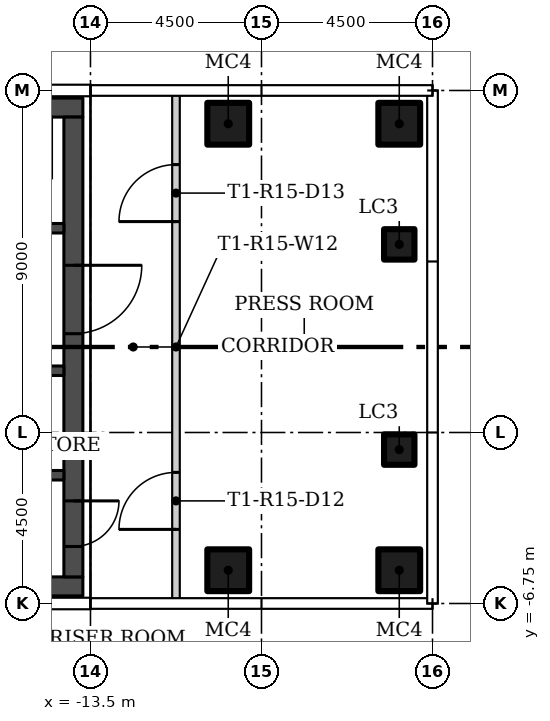
"""IFC4 building model, lengths in metres.
Left out: names, types, materials, properties, quantities, classifications, styles, units other than length and angle.
Written with IfcOpenShell. Run it as: python <this file> out.ifc"""

import sys

from ifc_helpers import new_model, si_unit, direction, frame, frame_2d, origin, origin_2d, place, context, subcontext, project, spatial, rectangle, hollow_rectangle, extrude, element, fill, save


model = new_model("IFC4")
c1 = context("Model", 3, precision=1e-05, world=origin(), true_north=direction((0.0, 1.0)))
c2 = subcontext(c1, "Body", "Model", "MODEL_VIEW")
j1 = project(units=[si_unit("LENGTHUNIT", "METRE"), si_unit("PLANEANGLEUNIT", "RADIAN")], contexts=[c1])
p1 = place(None, origin())
s1 = spatial("IfcSite", under=j1, at=p1, CompositionType="ELEMENT")
p2 = place(p1, origin())
s2 = spatial("IfcBuilding", under=s1, at=p2, CompositionType="ELEMENT")
p3 = place(p2, frame((0.0, 0.0, 142.8)))
s3 = spatial("IfcBuildingStorey", under=s2, at=p3, CompositionType="ELEMENT", Elevation=142.8)
for number, where in (
    (1, (-9.875, -5.875, 0.0)),
    (2, (-5.375, -5.875, 0.0)),
    (3, (-9.875, 5.875, 0.0)),
    (4, (-5.375, 5.875, 0.0)),
):
    element("IfcColumn", number, at=place(p3, frame(where)), inside=s3, PredefinedType="COLUMN", context=c2, shape_type="SweptSolid", body=[
        extrude(hollow_rectangle(XDim=1.1, YDim=1.1, WallThickness=0.04, at=origin_2d()), origin(), (0.0, 0.0, 1.0), 3.55),
    ])
for number, where in (
    (5, (-5.375, -2.7, 0.0)),
    (6, (-5.375, 2.7, 0.0)),
):
    element("IfcColumn", number, at=place(p3, frame(where)), inside=s3, PredefinedType="COLUMN", context=c2, shape_type="SweptSolid", body=[
        extrude(hollow_rectangle(XDim=0.8, YDim=0.8, WallThickness=0.03, at=origin_2d()), origin(), (0.0, 0.0, 1.0), 3.55),
    ])
p4 = place(p3, frame((-11.25, -6.655, 0.0), z_axis=(0.0, 0.0, 1.0), x_axis=(0.0, 1.0, 0.0)))
e7 = element("IfcWall", 7, at=p4, inside=s3, PredefinedType="PARTITIONING", context=c2, shape_type="SweptSolid", body=[
    extrude(rectangle(XDim=13.31, YDim=0.2, at=frame_2d((6.655, 0.0))), origin(), (0.0, 0.0, 1.0), 3.55),
])
p5 = place(p4, frame((1.855, 0.0, 0.0)))
e8 = element("IfcOpeningElement", 8, at=p5, cuts=e7, PredefinedType="OPENING", context=c2, shape_type="SweptSolid", body=[
    extrude(rectangle(XDim=1.5, YDim=2.1, at=frame_2d((0.75, 1.05))), frame((0.0, 0.11, 0.0), z_axis=(0.0, -1.0, 0.0), x_axis=(1.0, 0.0, 0.0)), (0.0, 0.0, 1.0), 0.22),
])
p6 = place(p4, frame((9.955, 0.0, 0.0)))
e9 = element("IfcOpeningElement", 9, at=p6, cuts=e7, PredefinedType="OPENING", context=c2, shape_type="SweptSolid", body=[
    extrude(rectangle(XDim=1.5, YDim=2.1, at=frame_2d((0.75, 1.05))), frame((0.0, 0.11, 0.0), z_axis=(0.0, -1.0, 0.0), x_axis=(1.0, 0.0, 0.0)), (0.0, 0.0, 1.0), 0.22),
])
for number, where in (
    (10, (-26.8, -6.3, 0.0)),
    (11, (-26.8, 6.3, 0.0)),
):
    element("IfcWall", number, at=place(p3, frame(where)), inside=s3, PredefinedType="SHEAR", context=c2, shape_type="SweptSolid", body=[
        extrude(rectangle(XDim=13.1, YDim=0.5, at=frame_2d((6.55, 0.0))), origin(), (0.0, 0.0, 1.0), 3.55),
    ])
p7 = place(p3, frame((-13.95, 6.05, 0.0), z_axis=(0.0, 0.0, 1.0), x_axis=(0.0, -1.0, 0.0)))
e12 = element("IfcWall", 12, at=p7, inside=s3, PredefinedType="SHEAR", context=c2, shape_type="SweptSolid", body=[
    extrude(rectangle(XDim=12.1, YDim=0.5, at=frame_2d((6.05, 0.0))), origin(), (0.0, 0.0, 1.0), 3.55),
])
p8 = place(p7, frame((10.1, 0.0, 0.0)))
e13 = element("IfcOpeningElement", 13, at=p8, cuts=e12, PredefinedType="OPENING", context=c2, shape_type="SweptSolid", body=[
    extrude(rectangle(XDim=1.2, YDim=2.1, at=frame_2d((0.6, 1.05))), frame((0.0, 0.26, 0.0), z_axis=(0.0, -1.0, 0.0), x_axis=(1.0, 0.0, 0.0)), (0.0, 0.0, 1.0), 0.52),
])
p9 = place(p7, frame((3.9, 0.0, 0.0)))
e14 = element("IfcOpeningElement", 14, at=p9, cuts=e12, PredefinedType="OPENING", context=c2, shape_type="SweptSolid", body=[
    extrude(rectangle(XDim=1.8, YDim=2.4, at=frame_2d((0.9, 1.2))), frame((0.0, 0.26, 0.0), z_axis=(0.0, -1.0, 0.0), x_axis=(1.0, 0.0, 0.0)), (0.0, 0.0, 1.0), 0.52),
])
p10 = place(p3, frame((-14.2, -3.375, 0.0), z_axis=(0.0, 0.0, 1.0), x_axis=(-1.0, 0.0, 0.0)))
e15 = element("IfcWall", 15, at=p10, inside=s3, PredefinedType="SHEAR", context=c2, shape_type="SweptSolid", body=[
    extrude(rectangle(XDim=12.1, YDim=0.25, at=frame_2d((6.05, 0.0))), origin(), (0.0, 0.0, 1.0), 3.55),
])
p11 = place(p10, frame((10.95, 0.0, 0.0)))
e16 = element("IfcOpeningElement", 16, at=p11, cuts=e15, PredefinedType="OPENING", context=c2, shape_type="SweptSolid", body=[
    extrude(rectangle(XDim=1.1, YDim=2.1, at=frame_2d((0.55, 1.05))), frame((0.0, 0.135, 0.0), z_axis=(0.0, -1.0, 0.0), x_axis=(1.0, 0.0, 0.0)), (0.0, 0.0, 1.0), 0.27),
])
p12 = place(p3, frame((-14.2, -0.625, 0.0), z_axis=(0.0, 0.0, 1.0), x_axis=(-1.0, 0.0, 0.0)))
e17 = element("IfcWall", 17, at=p12, inside=s3, PredefinedType="SHEAR", context=c2, shape_type="SweptSolid", body=[
    extrude(rectangle(XDim=12.1, YDim=0.25, at=frame_2d((6.05, 0.0))), origin(), (0.0, 0.0, 1.0), 3.55),
])
p13 = place(p12, frame((8.65, 0.0, 0.0)))
e18 = element("IfcOpeningElement", 18, at=p13, cuts=e17, PredefinedType="OPENING", context=c2, shape_type="SweptSolid", body=[
    extrude(rectangle(XDim=1.2, YDim=2.1, at=frame_2d((0.6, 1.05))), frame((0.0, 0.135, 0.0), z_axis=(0.0, -1.0, 0.0), x_axis=(1.0, 0.0, 0.0)), (0.0, 0.0, 1.0), 0.27),
])
p14 = place(p12, frame((2.15, 0.0, 0.0)))
e19 = element("IfcOpeningElement", 19, at=p14, cuts=e17, PredefinedType="OPENING", context=c2, shape_type="SweptSolid", body=[
    extrude(rectangle(XDim=0.9, YDim=2.1, at=frame_2d((0.45, 1.05))), frame((0.0, 0.135, 0.0), z_axis=(0.0, -1.0, 0.0), x_axis=(1.0, 0.0, 0.0)), (0.0, 0.0, 1.0), 0.27),
])
p15 = place(p12, frame((0.525, 0.0, 0.0)))
e20 = element("IfcOpeningElement", 20, at=p15, cuts=e17, PredefinedType="OPENING", context=c2, shape_type="SweptSolid", body=[
    extrude(rectangle(XDim=0.9, YDim=2.1, at=frame_2d((0.45, 1.05))), frame((0.0, 0.135, 0.0), z_axis=(0.0, -1.0, 0.0), x_axis=(1.0, 0.0, 0.0)), (0.0, 0.0, 1.0), 0.27),
])
p16 = place(p3, frame((-26.3, 3.125, 0.0)))
e21 = element("IfcWall", 21, at=p16, inside=s3, PredefinedType="SHEAR", context=c2, shape_type="SweptSolid", body=[
    extrude(rectangle(XDim=12.1, YDim=0.25, at=frame_2d((6.05, 0.0))), origin(), (0.0, 0.0, 1.0), 3.55),
])
p17 = place(p16, frame((6.95, 0.0, 0.0)))
e22 = element("IfcOpeningElement", 22, at=p17, cuts=e21, PredefinedType="OPENING", context=c2, shape_type="SweptSolid", body=[
    extrude(rectangle(XDim=1.1, YDim=2.1, at=frame_2d((0.55, 1.05))), frame((0.0, 0.135, 0.0), z_axis=(0.0, -1.0, 0.0), x_axis=(1.0, 0.0, 0.0)), (0.0, 0.0, 1.0), 0.27),
])
p18 = place(p16, frame((10.075, 0.0, 0.0)))
e23 = element("IfcOpeningElement", 23, at=p18, cuts=e21, PredefinedType="OPENING", context=c2, shape_type="SweptSolid", body=[
    extrude(rectangle(XDim=1.1, YDim=2.1, at=frame_2d((0.55, 1.05))), frame((0.0, 0.135, 0.0), z_axis=(0.0, -1.0, 0.0), x_axis=(1.0, 0.0, 0.0)), (0.0, 0.0, 1.0), 0.27),
])
p19 = place(p16, frame((0.7, 0.0, 0.0)))
e24 = element("IfcOpeningElement", 24, at=p19, cuts=e21, PredefinedType="OPENING", context=c2, shape_type="SweptSolid", body=[
    extrude(rectangle(XDim=0.9, YDim=2.1, at=frame_2d((0.45, 1.05))), frame((0.0, 0.135, 0.0), z_axis=(0.0, -1.0, 0.0), x_axis=(1.0, 0.0, 0.0)), (0.0, 0.0, 1.0), 0.27),
])
p20 = place(p16, frame((3.625, 0.0, 0.0)))
e25 = element("IfcOpeningElement", 25, at=p20, cuts=e21, PredefinedType="OPENING", context=c2, shape_type="SweptSolid", body=[
    extrude(rectangle(XDim=0.9, YDim=2.1, at=frame_2d((0.45, 1.05))), frame((0.0, 0.135, 0.0), z_axis=(0.0, -1.0, 0.0), x_axis=(1.0, 0.0, 0.0)), (0.0, 0.0, 1.0), 0.27),
])
p21 = place(p5, origin())
e26 = element("IfcDoor", 26, at=p21, inside=s3, OperationType="DOUBLE_DOOR_SINGLE_SWING", PredefinedType="DOOR", context=c2, shape_type="SweptSolid", body=[
    extrude(rectangle(XDim=1.5, YDim=2.1, at=frame_2d((0.75, 1.05))), frame((0.0, 0.025, 0.0), z_axis=(0.0, -1.0, 0.0), x_axis=(1.0, 0.0, 0.0)), (0.0, 0.0, 1.0), 0.05),
])
fill(e8, e26)
p22 = place(p6, origin())
e27 = element("IfcDoor", 27, at=p22, inside=s3, OperationType="DOUBLE_DOOR_SINGLE_SWING", PredefinedType="DOOR", context=c2, shape_type="SweptSolid", body=[
    extrude(rectangle(XDim=1.5, YDim=2.1, at=frame_2d((0.75, 1.05))), frame((0.0, 0.025, 0.0), z_axis=(0.0, -1.0, 0.0), x_axis=(1.0, 0.0, 0.0)), (0.0, 0.0, 1.0), 0.05),
])
fill(e9, e27)
p23 = place(p8, origin())
e28 = element("IfcDoor", 28, at=p23, inside=s3, OperationType="SINGLE_SWING_RIGHT", PredefinedType="DOOR", context=c2, shape_type="SweptSolid", body=[
    extrude(rectangle(XDim=1.2, YDim=2.1, at=frame_2d((0.6, 1.05))), frame((0.0, 0.025, 0.0), z_axis=(0.0, -1.0, 0.0), x_axis=(1.0, 0.0, 0.0)), (0.0, 0.0, 1.0), 0.05),
])
fill(e13, e28)
p24 = place(p9, origin())
e29 = element("IfcDoor", 29, at=p24, inside=s3, OperationType="DOUBLE_DOOR_SINGLE_SWING", PredefinedType="DOOR", context=c2, shape_type="SweptSolid", body=[
    extrude(rectangle(XDim=1.8, YDim=2.4, at=frame_2d((0.9, 1.2))), frame((0.0, 0.025, 0.0), z_axis=(0.0, -1.0, 0.0), x_axis=(1.0, 0.0, 0.0)), (0.0, 0.0, 1.0), 0.05),
])
fill(e14, e29)
save(model, sys.argv[1])
